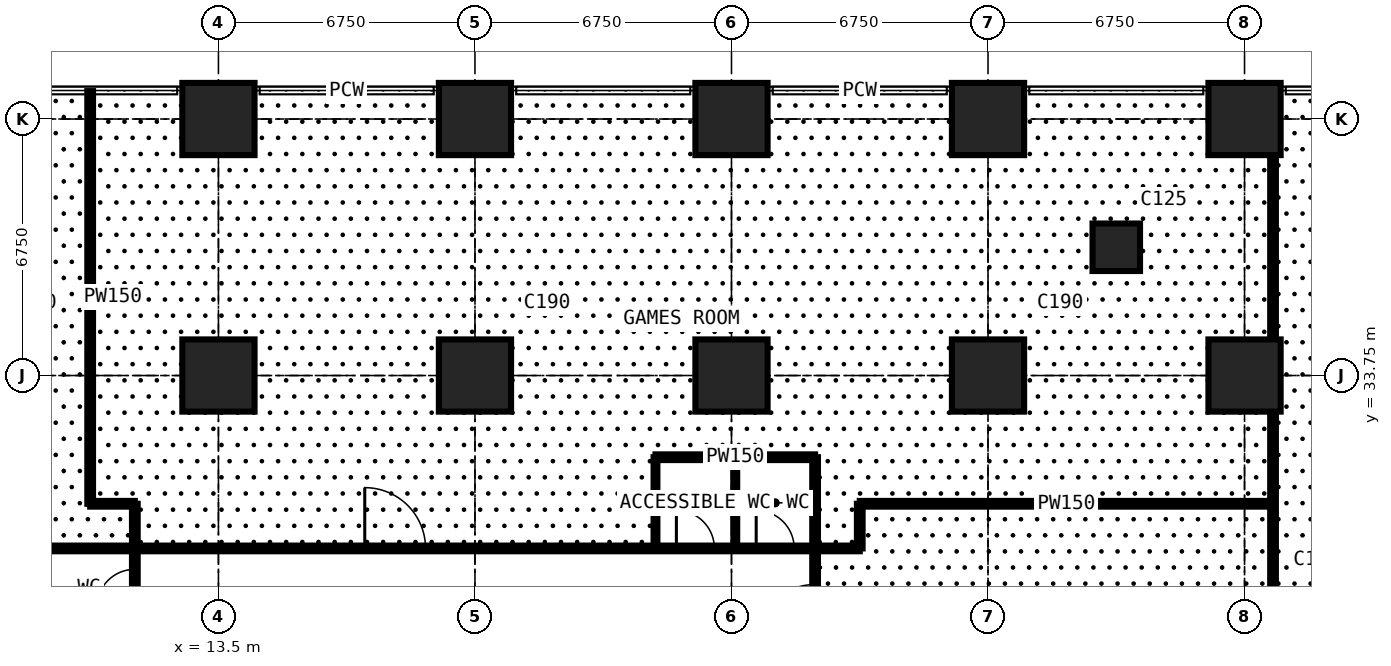
"""IFC4 building model, lengths in metres.
Left out: names, types, materials, properties, quantities, classifications, styles, units other than length and angle.
Written with IfcOpenShell. Run it as: python <this file> out.ifc"""

import sys

from ifc_helpers import new_model, si_unit, direction, frame, frame_2d, origin, origin_2d, place, context, subcontext, project, spatial, rectangle, extrude, element, fill, save


model = new_model("IFC4")
c1 = context("Model", 3, precision=1e-05, world=origin(), true_north=direction((0.0, 1.0)))
c2 = subcontext(c1, "Body", "Model", "MODEL_VIEW")
j1 = project(units=[si_unit("LENGTHUNIT", "METRE"), si_unit("PLANEANGLEUNIT", "RADIAN")], contexts=[c1])
p1 = place(None, origin())
s1 = spatial("IfcSite", under=j1, at=p1, CompositionType="ELEMENT")
p2 = place(p1, origin())
s2 = spatial("IfcBuilding", under=s1, at=p2, CompositionType="ELEMENT")
p3 = place(p2, frame((0.0, 0.0, 4.5)))
s3 = spatial("IfcBuildingStorey", under=s2, at=p3, CompositionType="ELEMENT", Elevation=4.5)
for number, where, z_axis, x_axis in (
    (1, (13.5, 33.75, 0.0), (0.0, 0.0, 1.0), (1.0, 0.0, 0.0)),
    (2, (13.5, 40.5, 0.0), (0.0, 0.0, 1.0), (1.0, 0.0, 0.0)),
    (3, (20.25, 33.75, 0.0), (0.0, 0.0, 1.0), (1.0, 0.0, 0.0)),
    (4, (20.25, 40.5, 0.0), (0.0, 0.0, 1.0), (1.0, 0.0, 0.0)),
    (5, (27.0, 33.75, 0.0), (0.0, 0.0, 1.0), (1.0, 0.0, 0.0)),
    (6, (27.0, 40.5, 0.0), (0.0, 0.0, 1.0), (1.0, 0.0, 0.0)),
    (7, (33.75, 33.75, 0.0), (0.0, 0.0, 1.0), (1.0, 0.0, 0.0)),
    (8, (33.75, 40.5, 0.0), (0.0, 0.0, 1.0), (1.0, 0.0, 0.0)),
):
    element("IfcColumn", number, at=place(p3, frame(where, z_axis=z_axis, x_axis=x_axis)), inside=s3, PredefinedType="COLUMN", context=c2, shape_type="SweptSolid", body=[
        extrude(rectangle(XDim=1.9, YDim=1.9, at=origin_2d()), origin(), (0.0, 0.0, 1.0), 4.5),
    ])
p4 = place(p3, frame((37.125, 37.125, 0.0), z_axis=(0.0, 0.0, 1.0), x_axis=(1.0, 0.0, 0.0)))
e9 = element("IfcColumn", 9, at=p4, inside=s3, PredefinedType="COLUMN", context=c2, shape_type="SweptSolid", body=[
    extrude(rectangle(XDim=1.25, YDim=1.25, at=origin_2d()), origin(), (0.0, 0.0, 1.0), 4.5),
])
for number, where, z_axis, x_axis in (
    (10, (40.5, 33.75, 0.0), (0.0, 0.0, 1.0), (1.0, 0.0, 0.0)),
    (11, (40.5, 40.5, 0.0), (0.0, 0.0, 1.0), (1.0, 0.0, 0.0)),
):
    element("IfcColumn", number, at=place(p3, frame(where, z_axis=z_axis, x_axis=x_axis)), inside=s3, PredefinedType="COLUMN", context=c2, shape_type="SweptSolid", body=[
        extrude(rectangle(XDim=1.9, YDim=1.9, at=origin_2d()), origin(), (0.0, 0.0, 1.0), 4.5),
    ])
p5 = place(p3, frame((8.9, 29.2, 0.0), z_axis=(0.0, 0.0, 1.0), x_axis=(1.0, 0.0, 0.0)))
e12 = element("IfcWall", 12, at=p5, inside=s3, PredefinedType="PARTITIONING", context=c2, shape_type="SweptSolid", body=[
    extrude(rectangle(XDim=21.475, YDim=0.15, at=frame_2d((10.738, 0.0))), origin(), (0.0, 0.0, 1.0), 4.25),
])
p6 = place(p5, frame((16.65, 0.0, 0.0)))
e13 = element("IfcOpeningElement", 13, at=p6, cuts=e12, PredefinedType="OPENING", context=c2, shape_type="SweptSolid", body=[
    extrude(rectangle(XDim=1.0, YDim=2.2, at=frame_2d((0.5, 1.1))), frame((0.0, 0.085, 0.0), z_axis=(0.0, -1.0, 0.0), x_axis=(1.0, 0.0, 0.0)), (0.0, 0.0, 1.0), 0.17),
])
p7 = place(p5, frame((18.75, 0.0, 0.0)))
e14 = element("IfcOpeningElement", 14, at=p7, cuts=e12, PredefinedType="OPENING", context=c2, shape_type="SweptSolid", body=[
    extrude(rectangle(XDim=1.0, YDim=2.2, at=frame_2d((0.5, 1.1))), frame((0.0, 0.085, 0.0), z_axis=(0.0, -1.0, 0.0), x_axis=(1.0, 0.0, 0.0)), (0.0, 0.0, 1.0), 0.17),
])
p8 = place(p5, frame((8.45, 0.0, 0.0)))
e15 = element("IfcOpeningElement", 15, at=p8, cuts=e12, PredefinedType="OPENING", context=c2, shape_type="SweptSolid", body=[
    extrude(rectangle(XDim=1.6, YDim=2.4, at=frame_2d((0.8, 1.2))), frame((0.0, 0.085, 0.0), z_axis=(0.0, -1.0, 0.0), x_axis=(1.0, 0.0, 0.0)), (0.0, 0.0, 1.0), 0.17),
])
p9 = place(p3, frame((10.125, 30.375, 0.0), z_axis=(0.0, 0.0, 1.0), x_axis=(0.0, 1.0, 0.0)))
e16 = element("IfcWall", 16, at=p9, inside=s3, PredefinedType="PARTITIONING", context=c2, shape_type="SweptSolid", body=[
    extrude(rectangle(XDim=10.859, YDim=0.15, at=frame_2d((5.429, 0.0))), origin(), (0.0, 0.0, 1.0), 4.25),
])
p10 = place(p3, frame((10.125, 30.375, 0.0), z_axis=(0.0, 0.0, 1.0), x_axis=(1.0, 0.0, 0.0)))
e17 = element("IfcWall", 17, at=p10, inside=s3, PredefinedType="PARTITIONING", context=c2, shape_type="SweptSolid", body=[
    extrude(rectangle(XDim=1.175, YDim=0.15, at=frame_2d((0.587, 0.0))), origin(), (0.0, 0.0, 1.0), 4.25),
])
p11 = place(p3, frame((11.3, 8.9, 0.0), z_axis=(0.0, 0.0, 1.0), x_axis=(0.0, 1.0, 0.0)))
e18 = element("IfcWall", 18, at=p11, inside=s3, PredefinedType="PARTITIONING", context=c2, shape_type="SweptSolid", body=[
    extrude(rectangle(XDim=21.475, YDim=0.15, at=frame_2d((10.738, 0.0))), origin(), (0.0, 0.0, 1.0), 4.25),
])
p12 = place(p11, frame((16.65, 0.0, 0.0)))
e19 = element("IfcOpeningElement", 19, at=p12, cuts=e18, PredefinedType="OPENING", context=c2, shape_type="SweptSolid", body=[
    extrude(rectangle(XDim=1.0, YDim=2.2, at=frame_2d((0.5, 1.1))), frame((0.0, 0.085, 0.0), z_axis=(0.0, -1.0, 0.0), x_axis=(1.0, 0.0, 0.0)), (0.0, 0.0, 1.0), 0.17),
])
p13 = place(p11, frame((18.75, 0.0, 0.0)))
e20 = element("IfcOpeningElement", 20, at=p13, cuts=e18, PredefinedType="OPENING", context=c2, shape_type="SweptSolid", body=[
    extrude(rectangle(XDim=1.0, YDim=2.2, at=frame_2d((0.5, 1.1))), frame((0.0, 0.085, 0.0), z_axis=(0.0, -1.0, 0.0), x_axis=(1.0, 0.0, 0.0)), (0.0, 0.0, 1.0), 0.17),
])
p14 = place(p11, frame((8.45, 0.0, 0.0)))
e21 = element("IfcOpeningElement", 21, at=p14, cuts=e18, PredefinedType="OPENING", context=c2, shape_type="SweptSolid", body=[
    extrude(rectangle(XDim=1.6, YDim=2.4, at=frame_2d((0.8, 1.2))), frame((0.0, 0.085, 0.0), z_axis=(0.0, -1.0, 0.0), x_axis=(1.0, 0.0, 0.0)), (0.0, 0.0, 1.0), 0.17),
])
p15 = place(p3, frame((25.0, 29.2, 0.0), z_axis=(0.0, 0.0, 1.0), x_axis=(0.0, 1.0, 0.0)))
e22 = element("IfcWall", 22, at=p15, inside=s3, PredefinedType="PARTITIONING", context=c2, shape_type="SweptSolid", body=[
    extrude(rectangle(XDim=2.4, YDim=0.1, at=frame_2d((1.2, 0.0))), origin(), (0.0, 0.0, 1.0), 4.25),
])
p16 = place(p3, frame((25.0, 31.6, 0.0), z_axis=(0.0, 0.0, 1.0), x_axis=(1.0, 0.0, 0.0)))
e23 = element("IfcWall", 23, at=p16, inside=s3, PredefinedType="PARTITIONING", context=c2, shape_type="SweptSolid", body=[
    extrude(rectangle(XDim=4.2, YDim=0.15, at=frame_2d((2.1, 0.0))), origin(), (0.0, 0.0, 1.0), 4.25),
])
p17 = place(p3, frame((27.1, 29.2, 0.0), z_axis=(0.0, 0.0, 1.0), x_axis=(0.0, 1.0, 0.0)))
e24 = element("IfcWall", 24, at=p17, inside=s3, PredefinedType="PARTITIONING", context=c2, shape_type="SweptSolid", body=[
    extrude(rectangle(XDim=2.4, YDim=0.1, at=frame_2d((1.2, 0.0))), origin(), (0.0, 0.0, 1.0), 3.752),
])
p18 = place(p3, frame((29.2, 11.3, 0.0), z_axis=(0.0, 0.0, 1.0), x_axis=(0.0, 1.0, 0.0)))
e25 = element("IfcWall", 25, at=p18, inside=s3, PredefinedType="PARTITIONING", context=c2, shape_type="SweptSolid", body=[
    extrude(rectangle(XDim=20.3, YDim=0.15, at=frame_2d((10.15, 0.0))), origin(), (0.0, 0.0, 1.0), 4.25),
])
p19 = place(p18, frame((15.35, 0.0, 0.0)))
e26 = element("IfcOpeningElement", 26, at=p19, cuts=e25, PredefinedType="OPENING", context=c2, shape_type="SweptSolid", body=[
    extrude(rectangle(XDim=1.6, YDim=2.4, at=frame_2d((0.8, 1.2))), frame((0.0, 0.085, 0.0), z_axis=(0.0, -1.0, 0.0), x_axis=(1.0, 0.0, 0.0)), (0.0, 0.0, 1.0), 0.17),
])
p20 = place(p18, frame((8.35, 0.0, 0.0)))
e27 = element("IfcOpeningElement", 27, at=p20, cuts=e25, PredefinedType="OPENING", context=c2, shape_type="SweptSolid", body=[
    extrude(rectangle(XDim=1.2, YDim=2.2, at=frame_2d((0.6, 1.1))), frame((0.0, 0.085, 0.0), z_axis=(0.0, -1.0, 0.0), x_axis=(1.0, 0.0, 0.0)), (0.0, 0.0, 1.0), 0.17),
])
p21 = place(p3, frame((30.375, 29.2, 0.0), z_axis=(0.0, 0.0, 1.0), x_axis=(0.0, 1.0, 0.0)))
e28 = element("IfcWall", 28, at=p21, inside=s3, PredefinedType="PARTITIONING", context=c2, shape_type="SweptSolid", body=[
    extrude(rectangle(XDim=1.175, YDim=0.15, at=frame_2d((0.587, 0.0))), origin(), (0.0, 0.0, 1.0), 4.25),
])
p22 = place(p3, frame((30.375, 30.375, 0.0), z_axis=(0.0, 0.0, 1.0), x_axis=(1.0, 0.0, 0.0)))
e29 = element("IfcWall", 29, at=p22, inside=s3, PredefinedType="PARTITIONING", context=c2, shape_type="SweptSolid", body=[
    extrude(rectangle(XDim=10.875, YDim=0.15, at=frame_2d((5.438, 0.0))), origin(), (0.0, 0.0, 1.0), 4.25),
])
p23 = place(p3, frame((41.25, -0.75, 0.0), z_axis=(0.0, 0.0, 1.0), x_axis=(0.0, 1.0, 0.0)))
e30 = element("IfcWall", 30, at=p23, inside=s3, PredefinedType="PARTITIONING", context=c2, shape_type="SweptSolid", body=[
    extrude(rectangle(XDim=41.984, YDim=0.15, at=frame_2d((20.992, 0.0))), origin(), (0.0, 0.0, 1.0), 4.25),
])
p24 = place(p23, frame((15.2, 0.0, 0.0)))
e31 = element("IfcOpeningElement", 31, at=p24, cuts=e30, PredefinedType="OPENING", context=c2, shape_type="SweptSolid", body=[
    extrude(rectangle(XDim=1.6, YDim=2.4, at=frame_2d((0.8, 1.2))), frame((0.0, 0.085, 0.0), z_axis=(0.0, -1.0, 0.0), x_axis=(1.0, 0.0, 0.0)), (0.0, 0.0, 1.0), 0.17),
])
p25 = place(p19, origin())
e32 = element("IfcDoor", 32, at=p25, inside=s3, OperationType="DOUBLE_DOOR_SINGLE_SWING", PredefinedType="DOOR", context=c2, shape_type="SweptSolid", body=[
    extrude(rectangle(XDim=1.6, YDim=2.4, at=frame_2d((0.8, 1.2))), frame((0.0, 0.025, 0.0), z_axis=(0.0, -1.0, 0.0), x_axis=(1.0, 0.0, 0.0)), (0.0, 0.0, 1.0), 0.05),
])
fill(e26, e32)
p26 = place(p6, origin())
e33 = element("IfcDoor", 33, at=p26, inside=s3, OperationType="SINGLE_SWING_LEFT", PredefinedType="DOOR", context=c2, shape_type="SweptSolid", body=[
    extrude(rectangle(XDim=1.0, YDim=2.2, at=frame_2d((0.5, 1.1))), frame((0.0, 0.025, 0.0), z_axis=(0.0, -1.0, 0.0), x_axis=(1.0, 0.0, 0.0)), (0.0, 0.0, 1.0), 0.05),
])
fill(e13, e33)
p27 = place(p7, origin())
e34 = element("IfcDoor", 34, at=p27, inside=s3, OperationType="SINGLE_SWING_LEFT", PredefinedType="DOOR", context=c2, shape_type="SweptSolid", body=[
    extrude(rectangle(XDim=1.0, YDim=2.2, at=frame_2d((0.5, 1.1))), frame((0.0, 0.025, 0.0), z_axis=(0.0, -1.0, 0.0), x_axis=(1.0, 0.0, 0.0)), (0.0, 0.0, 1.0), 0.05),
])
fill(e14, e34)
p28 = place(p8, origin())
e35 = element("IfcDoor", 35, at=p28, inside=s3, OperationType="DOUBLE_DOOR_SINGLE_SWING", PredefinedType="DOOR", context=c2, shape_type="SweptSolid", body=[
    extrude(rectangle(XDim=1.6, YDim=2.4, at=frame_2d((0.8, 1.2))), frame((0.0, 0.025, 0.0), z_axis=(0.0, -1.0, 0.0), x_axis=(1.0, 0.0, 0.0)), (0.0, 0.0, 1.0), 0.05),
])
fill(e15, e35)
p29 = place(p13, origin())
e36 = element("IfcDoor", 36, at=p29, inside=s3, OperationType="SINGLE_SWING_LEFT", PredefinedType="DOOR", context=c2, shape_type="SweptSolid", body=[
    extrude(rectangle(XDim=1.0, YDim=2.2, at=frame_2d((0.5, 1.1))), frame((0.0, 0.025, 0.0), z_axis=(0.0, -1.0, 0.0), x_axis=(1.0, 0.0, 0.0)), (0.0, 0.0, 1.0), 0.05),
])
fill(e20, e36)
save(model, sys.argv[1])
